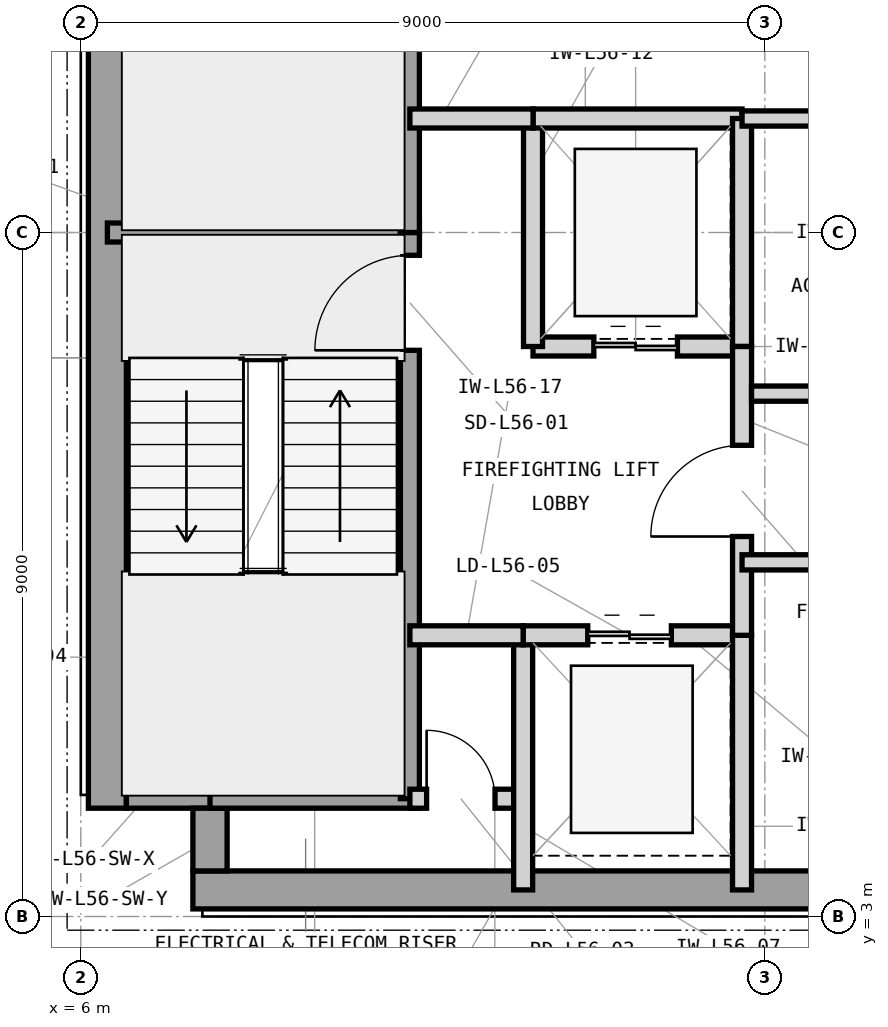
"""IFC4 building model, lengths in metres.
Left out: names, types, materials, properties, quantities, classifications, styles, units other than length and angle.
Written with IfcOpenShell. Run it as: python <this file> out.ifc"""

import sys

from ifc_helpers import new_model, si_unit, direction, frame, frame_2d, origin, place, context, subcontext, project, spatial, rectangle, extrude, element, fill, save


model = new_model("IFC4")
c1 = context("Model", 3, precision=1e-05, world=origin(), true_north=direction((0.0, 1.0)))
c2 = subcontext(c1, "Body", "Model", "MODEL_VIEW")
j1 = project(units=[si_unit("LENGTHUNIT", "METRE"), si_unit("PLANEANGLEUNIT", "RADIAN")], contexts=[c1])
p1 = place(None, origin())
s1 = spatial("IfcSite", under=j1, at=p1, CompositionType="ELEMENT")
p2 = place(p1, origin())
s2 = spatial("IfcBuilding", under=s1, at=p2, CompositionType="ELEMENT")
p3 = place(p2, frame((0.0, 0.0, 231.3)))
s3 = spatial("IfcBuildingStorey", under=s2, at=p3, CompositionType="ELEMENT", Elevation=231.3)
p4 = place(p3, frame((7.475, 3.35, 0.0), z_axis=(0.0, 0.0, 1.0), x_axis=(1.0, 0.0, 0.0)))
e1 = element("IfcWall", 1, at=p4, inside=s3, PredefinedType="SHEAR", context=c2, shape_type="SweptSolid", body=[
    extrude(rectangle(XDim=16.425, YDim=0.5, at=frame_2d((8.212, 0.0))), origin(), (0.0, 0.0, 1.0), 3.9),
])
p5 = place(p3, frame((6.35, 4.425, 0.0), z_axis=(0.0, 0.0, 1.0), x_axis=(0.0, 1.0, 0.0)))
e2 = element("IfcWall", 2, at=p5, inside=s3, PredefinedType="SHEAR", context=c2, shape_type="SweptSolid", body=[
    extrude(rectangle(XDim=15.15, YDim=0.5, at=frame_2d((7.575, 0.0))), origin(), (0.0, 0.0, 1.0), 3.9),
])
p6 = place(p3, frame((6.6, 4.65, 0.0), z_axis=(0.0, 0.0, 1.0), x_axis=(1.0, 0.0, 0.0)))
e3 = element("IfcWall", 3, at=p6, inside=s3, PredefinedType="SHEAR", context=c2, shape_type="SweptSolid", body=[
    extrude(rectangle(XDim=1.325, YDim=0.45, at=frame_2d((0.663, 0.0))), origin(), (0.0, 0.0, 1.0), 3.9),
])
p7 = place(p3, frame((7.7, 3.6, 0.0), z_axis=(0.0, 0.0, 1.0), x_axis=(0.0, 1.0, 0.0)))
e4 = element("IfcWall", 4, at=p7, inside=s3, PredefinedType="SHEAR", context=c2, shape_type="SweptSolid", body=[
    extrude(rectangle(XDim=0.825, YDim=0.45, at=frame_2d((0.413, 0.0))), origin(), (0.0, 0.0, 1.0), 3.9),
])
p8 = place(p3, frame((6.35, 12.0, 0.0), z_axis=(0.0, 0.0, 1.0), x_axis=(1.0, 0.0, 0.0)))
e5 = element("IfcWall", 5, at=p8, inside=s3, PredefinedType="SHEAR", context=c2, shape_type="SweptSolid", body=[
    extrude(rectangle(XDim=4.105, YDim=0.25, at=frame_2d((2.052, 0.0))), origin(), (0.0, 0.0, 1.0), 3.9),
])
p9 = place(p3, frame((7.7, 4.55, 0.0), z_axis=(0.0, 0.0, 1.0), x_axis=(1.0, 0.0, 0.0)))
e6 = element("IfcWall", 6, at=p9, inside=s3, PredefinedType="SHEAR", context=c2, shape_type="SweptSolid", body=[
    extrude(rectangle(XDim=2.755, YDim=0.25, at=frame_2d((1.377, 0.0))), origin(), (0.0, 0.0, 1.0), 3.9),
])
p10 = place(p3, frame((10.33, 4.55, 0.0), z_axis=(0.0, 0.0, 1.0), x_axis=(0.0, 1.0, 0.0)))
e7 = element("IfcWall", 7, at=p10, inside=s3, PredefinedType="SHEAR", context=c2, shape_type="SweptSolid", body=[
    extrude(rectangle(XDim=7.45, YDim=0.25, at=frame_2d((3.725, 0.0))), origin(), (0.0, 0.0, 1.0), 3.9),
])
p11 = place(p10, frame((5.9, 0.0, 0.0)))
e8 = element("IfcOpeningElement", 8, at=p11, cuts=e7, PredefinedType="OPENING", context=c2, shape_type="SweptSolid", body=[
    extrude(rectangle(XDim=1.25, YDim=2.2, at=frame_2d((0.625, 1.1))), frame((0.0, 0.135, 0.0), z_axis=(0.0, -1.0, 0.0), x_axis=(1.0, 0.0, 0.0)), (0.0, 0.0, 1.0), 0.27),
])
p12 = place(p3, frame((10.33, 12.0, 0.0), z_axis=(0.0, 0.0, 1.0), x_axis=(0.0, 1.0, 0.0)))
e9 = element("IfcWall", 9, at=p12, inside=s3, PredefinedType="SHEAR", context=c2, shape_type="SweptSolid", body=[
    extrude(rectangle(XDim=7.45, YDim=0.25, at=frame_2d((3.725, 0.0))), origin(), (0.0, 0.0, 1.0), 3.9),
])
p13 = place(p12, frame((5.85, 0.0, 0.0)))
e10 = element("IfcOpeningElement", 10, at=p13, cuts=e9, PredefinedType="OPENING", context=c2, shape_type="SweptSolid", body=[
    extrude(rectangle(XDim=1.25, YDim=2.2, at=frame_2d((0.625, 1.1))), frame((0.0, 0.135, 0.0), z_axis=(0.0, -1.0, 0.0), x_axis=(1.0, 0.0, 0.0)), (0.0, 0.0, 1.0), 0.27),
])
p14 = place(p3, frame((10.33, 4.55, 0.0), z_axis=(0.0, 0.0, 1.0), x_axis=(1.0, 0.0, 0.0)))
e11 = element("IfcWall", 11, at=p14, inside=s3, PredefinedType="PARTITIONING", context=c2, shape_type="SweptSolid", body=[
    extrude(rectangle(XDim=1.49, YDim=0.25, at=frame_2d((0.745, 0.0))), origin(), (0.0, 0.0, 1.0), 3.69),
])
p15 = place(p14, frame((0.22, 0.0, 0.0)))
e12 = element("IfcOpeningElement", 12, at=p15, cuts=e11, PredefinedType="OPENING", context=c2, shape_type="SweptSolid", body=[
    extrude(rectangle(XDim=0.9, YDim=2.1, at=frame_2d((0.45, 1.05))), frame((0.0, 0.135, 0.0), z_axis=(0.0, -1.0, 0.0), x_axis=(1.0, 0.0, 0.0)), (0.0, 0.0, 1.0), 0.27),
])
p16 = place(p3, frame((11.82, 3.35, 0.0), z_axis=(0.0, 0.0, 1.0), x_axis=(0.0, 1.0, 0.0)))
e13 = element("IfcWall", 13, at=p16, inside=s3, PredefinedType="PARTITIONING", context=c2, shape_type="SweptSolid", body=[
    extrude(rectangle(XDim=3.35, YDim=0.25, at=frame_2d((1.675, 0.0))), origin(), (0.0, 0.0, 1.0), 3.69),
])
p17 = place(p3, frame((11.82, 6.7, 0.0), z_axis=(0.0, 0.0, 1.0), x_axis=(1.0, 0.0, 0.0)))
e14 = element("IfcWall", 14, at=p17, inside=s3, PredefinedType="PARTITIONING", context=c2, shape_type="SweptSolid", body=[
    extrude(rectangle(XDim=2.88, YDim=0.25, at=frame_2d((1.44, 0.0))), origin(), (0.0, 0.0, 1.0), 3.073),
])
p18 = place(p17, frame((0.85, 0.0, 0.0)))
e15 = element("IfcOpeningElement", 15, at=p18, cuts=e14, PredefinedType="OPENING", context=c2, shape_type="SweptSolid", body=[
    extrude(rectangle(XDim=1.1, YDim=2.25, at=frame_2d((0.55, 1.125))), frame((0.0, 0.135, 0.0), z_axis=(0.0, -1.0, 0.0), x_axis=(1.0, 0.0, 0.0)), (0.0, 0.0, 1.0), 0.27),
])
p19 = place(p3, frame((14.7, 3.35, 0.0), z_axis=(0.0, 0.0, 1.0), x_axis=(0.0, 1.0, 0.0)))
e16 = element("IfcWall", 16, at=p19, inside=s3, PredefinedType="PARTITIONING", context=c2, shape_type="SweptSolid", body=[
    extrude(rectangle(XDim=3.35, YDim=0.25, at=frame_2d((1.675, 0.0))), origin(), (0.0, 0.0, 1.0), 3.69),
])
p20 = place(p3, frame((11.95, 10.5, 0.0), z_axis=(0.0, 0.0, 1.0), x_axis=(1.0, 0.0, 0.0)))
e17 = element("IfcWall", 17, at=p20, inside=s3, PredefinedType="PARTITIONING", context=c2, shape_type="SweptSolid", body=[
    extrude(rectangle(XDim=2.75, YDim=0.25, at=frame_2d((1.375, 0.0))), origin(), (0.0, 0.0, 1.0), 3.073),
])
p21 = place(p20, frame((0.8, 0.0, 0.0)))
e18 = element("IfcOpeningElement", 18, at=p21, cuts=e17, PredefinedType="OPENING", context=c2, shape_type="SweptSolid", body=[
    extrude(rectangle(XDim=1.1, YDim=2.25, at=frame_2d((0.55, 1.125))), frame((0.0, 0.135, 0.0), z_axis=(0.0, -1.0, 0.0), x_axis=(1.0, 0.0, 0.0)), (0.0, 0.0, 1.0), 0.27),
])
p22 = place(p3, frame((11.95, 10.5, 0.0), z_axis=(0.0, 0.0, 1.0), x_axis=(0.0, 1.0, 0.0)))
e19 = element("IfcWall", 19, at=p22, inside=s3, PredefinedType="PARTITIONING", context=c2, shape_type="SweptSolid", body=[
    extrude(rectangle(XDim=3.0, YDim=0.25, at=frame_2d((1.5, 0.0))), origin(), (0.0, 0.0, 1.0), 3.69),
])
p23 = place(p3, frame((11.95, 13.5, 0.0), z_axis=(0.0, 0.0, 1.0), x_axis=(1.0, 0.0, 0.0)))
e20 = element("IfcWall", 20, at=p23, inside=s3, PredefinedType="PARTITIONING", context=c2, shape_type="SweptSolid", body=[
    extrude(rectangle(XDim=2.75, YDim=0.25, at=frame_2d((1.375, 0.0))), origin(), (0.0, 0.0, 1.0), 3.073),
])
p24 = place(p3, frame((14.7, 10.5, 0.0), z_axis=(0.0, 0.0, 1.0), x_axis=(0.0, 1.0, 0.0)))
e21 = element("IfcWall", 21, at=p24, inside=s3, PredefinedType="PARTITIONING", context=c2, shape_type="SweptSolid", body=[
    extrude(rectangle(XDim=3.0, YDim=0.25, at=frame_2d((1.5, 0.0))), origin(), (0.0, 0.0, 1.0), 3.69),
])
p25 = place(p3, frame((14.7, 6.7, 0.0), z_axis=(0.0, 0.0, 1.0), x_axis=(0.0, 1.0, 0.0)))
e22 = element("IfcWall", 22, at=p25, inside=s3, PredefinedType="PARTITIONING", context=c2, shape_type="SweptSolid", body=[
    extrude(rectangle(XDim=3.8, YDim=0.25, at=frame_2d((1.9, 0.0))), origin(), (0.0, 0.0, 1.0), 3.69),
])
p26 = place(p25, frame((1.3, 0.0, 0.0)))
e23 = element("IfcOpeningElement", 23, at=p26, cuts=e22, PredefinedType="OPENING", context=c2, shape_type="SweptSolid", body=[
    extrude(rectangle(XDim=1.2, YDim=2.2, at=frame_2d((0.6, 1.1))), frame((0.0, 0.135, 0.0), z_axis=(0.0, -1.0, 0.0), x_axis=(1.0, 0.0, 0.0)), (0.0, 0.0, 1.0), 0.27),
])
p27 = place(p3, frame((10.33, 13.5, 0.0), z_axis=(0.0, 0.0, 1.0), x_axis=(1.0, 0.0, 0.0)))
e24 = element("IfcWall", 24, at=p27, inside=s3, PredefinedType="PARTITIONING", context=c2, shape_type="SweptSolid", body=[
    extrude(rectangle(XDim=1.62, YDim=0.25, at=frame_2d((0.81, 0.0))), origin(), (0.0, 0.0, 1.0), 3.073),
])
p28 = place(p3, frame((10.33, 6.7, 0.0), z_axis=(0.0, 0.0, 1.0), x_axis=(1.0, 0.0, 0.0)))
e25 = element("IfcWall", 25, at=p28, inside=s3, PredefinedType="PARTITIONING", context=c2, shape_type="SweptSolid", body=[
    extrude(rectangle(XDim=1.49, YDim=0.25, at=frame_2d((0.745, 0.0))), origin(), (0.0, 0.0, 1.0), 3.073),
])
p29 = place(p3, frame((14.7, 7.66, 0.0), z_axis=(0.0, 0.0, 1.0), x_axis=(1.0, 0.0, 0.0)))
e26 = element("IfcWall", 26, at=p29, inside=s3, PredefinedType="PARTITIONING", context=c2, shape_type="SweptSolid", body=[
    extrude(rectangle(XDim=6.15, YDim=0.2, at=frame_2d((3.075, 0.0))), origin(), (0.0, 0.0, 1.0), 3.69),
])
p30 = place(p29, frame((2.575, 0.0, 0.0)))
e27 = element("IfcOpeningElement", 27, at=p30, cuts=e26, PredefinedType="OPENING", context=c2, shape_type="SweptSolid", body=[
    extrude(rectangle(XDim=1.0, YDim=2.15, at=frame_2d((0.5, 1.075))), frame((0.0, 0.11, 0.0), z_axis=(0.0, -1.0, 0.0), x_axis=(1.0, 0.0, 0.0)), (0.0, 0.0, 1.0), 0.22),
])
p31 = place(p3, frame((14.825, 9.88, 0.0), z_axis=(0.0, 0.0, 1.0), x_axis=(1.0, 0.0, 0.0)))
e28 = element("IfcWall", 28, at=p31, inside=s3, PredefinedType="PARTITIONING", context=c2, shape_type="SweptSolid", body=[
    extrude(rectangle(XDim=8.825, YDim=0.2, at=frame_2d((4.413, 0.0))), origin(), (0.0, 0.0, 1.0), 3.69),
])
p32 = place(p3, frame((14.7, 13.5, 0.0), z_axis=(0.0, 0.0, 1.0), x_axis=(1.0, 0.0, 0.0)))
e29 = element("IfcWall", 29, at=p32, inside=s3, PredefinedType="PARTITIONING", context=c2, shape_type="SweptSolid", body=[
    extrude(rectangle(XDim=5.2, YDim=0.2, at=frame_2d((2.6, 0.0))), origin(), (0.0, 0.0, 1.0), 3.073),
])
p33 = place(p32, frame((2.125, 0.0, 0.0)))
e30 = element("IfcOpeningElement", 30, at=p33, cuts=e29, PredefinedType="OPENING", context=c2, shape_type="SweptSolid", body=[
    extrude(rectangle(XDim=0.95, YDim=2.1, at=frame_2d((0.475, 1.05))), frame((0.0, 0.11, 0.0), z_axis=(0.0, -1.0, 0.0), x_axis=(1.0, 0.0, 0.0)), (0.0, 0.0, 1.0), 0.22),
])
p34 = place(p11, origin())
e31 = element("IfcDoor", 31, at=p34, inside=s3, OperationType="SINGLE_SWING_LEFT", PredefinedType="DOOR", context=c2, shape_type="SweptSolid", body=[
    extrude(rectangle(XDim=1.25, YDim=2.2, at=frame_2d((0.625, 1.1))), frame((0.0, 0.025, 0.0), z_axis=(0.0, -1.0, 0.0), x_axis=(1.0, 0.0, 0.0)), (0.0, 0.0, 1.0), 0.05),
])
fill(e8, e31)
p35 = place(p15, origin())
e32 = element("IfcDoor", 32, at=p35, inside=s3, OperationType="SINGLE_SWING_LEFT", PredefinedType="TRAPDOOR", context=c2, shape_type="SweptSolid", body=[
    extrude(rectangle(XDim=0.9, YDim=2.1, at=frame_2d((0.45, 1.05))), frame((0.0, 0.025, 0.0), z_axis=(0.0, -1.0, 0.0), x_axis=(1.0, 0.0, 0.0)), (0.0, 0.0, 1.0), 0.05),
])
fill(e12, e32)
p36 = place(p18, origin())
e33 = element("IfcDoor", 33, at=p36, inside=s3, OperationType="DOUBLE_DOOR_SLIDING", PredefinedType="DOOR", context=c2, shape_type="SweptSolid", body=[
    extrude(rectangle(XDim=1.1, YDim=2.25, at=frame_2d((0.55, 1.125))), frame((0.0, 0.025, 0.0), z_axis=(0.0, -1.0, 0.0), x_axis=(1.0, 0.0, 0.0)), (0.0, 0.0, 1.0), 0.05),
])
fill(e15, e33)
p37 = place(p21, origin())
e34 = element("IfcDoor", 34, at=p37, inside=s3, OperationType="DOUBLE_DOOR_SLIDING", PredefinedType="DOOR", context=c2, shape_type="SweptSolid", body=[
    extrude(rectangle(XDim=1.1, YDim=2.25, at=frame_2d((0.55, 1.125))), frame((0.0, 0.025, 0.0), z_axis=(0.0, -1.0, 0.0), x_axis=(1.0, 0.0, 0.0)), (0.0, 0.0, 1.0), 0.05),
])
fill(e18, e34)
p38 = place(p26, origin())
e35 = element("IfcDoor", 35, at=p38, inside=s3, OperationType="SINGLE_SWING_LEFT", PredefinedType="DOOR", context=c2, shape_type="SweptSolid", body=[
    extrude(rectangle(XDim=1.2, YDim=2.2, at=frame_2d((0.6, 1.1))), frame((0.0, 0.025, 0.0), z_axis=(0.0, -1.0, 0.0), x_axis=(1.0, 0.0, 0.0)), (0.0, 0.0, 1.0), 0.05),
])
fill(e23, e35)
save(model, sys.argv[1])
